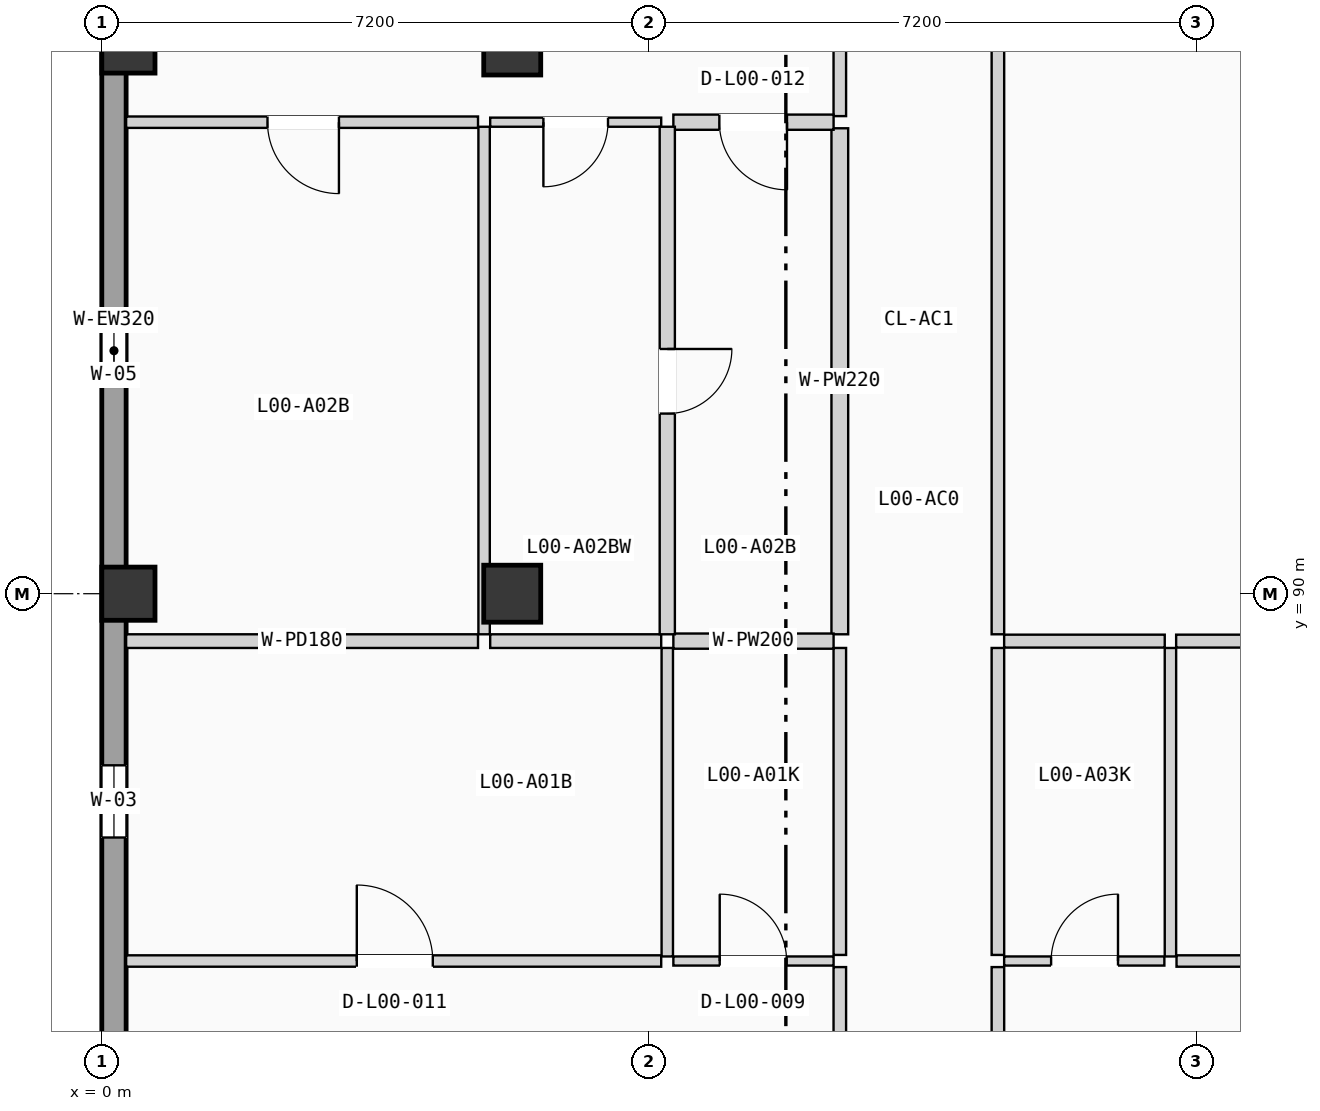
"""IFC4 building model, lengths in metres.
Left out: names, types, materials, properties, quantities, classifications, styles, units other than length and angle.
Written with IfcOpenShell. Run it as: python <this file> out.ifc"""

import sys

from ifc_helpers import new_model, si_unit, direction, frame, frame_2d, origin, origin_2d, place, context, subcontext, project, spatial, rectangle, extrude, element, fill, save


model = new_model("IFC4")
c1 = context("Model", 3, precision=1e-05, world=origin(), true_north=direction((0.0, 1.0)))
c2 = subcontext(c1, "Body", "Model", "MODEL_VIEW")
j1 = project(units=[si_unit("LENGTHUNIT", "METRE"), si_unit("PLANEANGLEUNIT", "RADIAN")], contexts=[c1])
p1 = place(None, origin())
s1 = spatial("IfcSite", under=j1, at=p1, CompositionType="ELEMENT")
p2 = place(p1, origin())
s2 = spatial("IfcBuilding", under=s1, at=p2, CompositionType="ELEMENT")
p3 = place(p2, origin())
s3 = spatial("IfcBuildingStorey", under=s2, at=p3, CompositionType="ELEMENT", Elevation=0.0)
for number, where, z_axis, x_axis in (
    (1, (0.35, 90.0, 0.0), (0.0, 0.0, 1.0), (1.0, 0.0, 0.0)),
    (2, (0.35, 97.2, 0.0), (0.0, 0.0, 1.0), (1.0, 0.0, 0.0)),
):
    element("IfcColumn", number, at=place(p3, frame(where, z_axis=z_axis, x_axis=x_axis)), inside=s3, PredefinedType="COLUMN", context=c2, shape_type="SweptSolid", body=[
        extrude(rectangle(XDim=0.7, YDim=0.7, at=origin_2d()), origin(), (0.0, 0.0, 1.0), 4.9),
    ])
for number, where, z_axis, x_axis in (
    (3, (5.4, 90.0, 0.0), (0.0, 0.0, 1.0), (1.0, 0.0, 0.0)),
    (4, (5.4, 97.2, 0.0), (0.0, 0.0, 1.0), (1.0, 0.0, 0.0)),
):
    element("IfcColumn", number, at=place(p3, frame(where, z_axis=z_axis, x_axis=x_axis)), inside=s3, PredefinedType="COLUMN", context=c2, shape_type="SweptSolid", body=[
        extrude(rectangle(XDim=0.75, YDim=0.75, at=origin_2d()), origin(), (0.0, 0.0, 1.0), 4.9),
    ])
p4 = place(p3, frame((0.16, 68.72, 0.0), z_axis=(0.0, 0.0, 1.0), x_axis=(0.0, 1.0, 0.0)))
e5 = element("IfcWall", 5, at=p4, inside=s3, PredefinedType="SOLIDWALL", context=c2, shape_type="SweptSolid", body=[
    extrude(rectangle(XDim=49.76, YDim=0.32, at=frame_2d((24.88, 0.0))), origin(), (0.0, 0.0, 1.0), 4.64),
])
p5 = place(p4, frame((12.169, 0.0, 0.9)))
e6 = element("IfcOpeningElement", 6, at=p5, cuts=e5, PredefinedType="OPENING", context=c2, shape_type="SweptSolid", body=[
    extrude(rectangle(XDim=0.95, YDim=1.2, at=frame_2d((0.475, 0.6))), frame((0.0, 0.17, 0.0), z_axis=(0.0, -1.0, 0.0), x_axis=(1.0, 0.0, 0.0)), (0.0, 0.0, 1.0), 0.34),
])
p6 = place(p4, frame((8.825, 0.0, 0.9)))
e7 = element("IfcOpeningElement", 7, at=p6, cuts=e5, PredefinedType="OPENING", context=c2, shape_type="SweptSolid", body=[
    extrude(rectangle(XDim=0.95, YDim=1.35, at=frame_2d((0.475, 0.675))), frame((0.0, 0.17, 0.0), z_axis=(0.0, -1.0, 0.0), x_axis=(1.0, 0.0, 0.0)), (0.0, 0.0, 1.0), 0.34),
])
p7 = place(p4, frame((18.072, 0.0, 0.9)))
e8 = element("IfcOpeningElement", 8, at=p7, cuts=e5, PredefinedType="OPENING", context=c2, shape_type="SweptSolid", body=[
    extrude(rectangle(XDim=0.95, YDim=1.5, at=frame_2d((0.475, 0.75))), frame((0.0, 0.17, 0.0), z_axis=(0.0, -1.0, 0.0), x_axis=(1.0, 0.0, 0.0)), (0.0, 0.0, 1.0), 0.34),
])
p8 = place(p4, frame((31.225, 0.0, 0.9)))
e9 = element("IfcOpeningElement", 9, at=p8, cuts=e5, PredefinedType="OPENING", context=c2, shape_type="SweptSolid", body=[
    extrude(rectangle(XDim=0.95, YDim=1.65, at=frame_2d((0.475, 0.825))), frame((0.0, 0.17, 0.0), z_axis=(0.0, -1.0, 0.0), x_axis=(1.0, 0.0, 0.0)), (0.0, 0.0, 1.0), 0.34),
])
p9 = place(p4, frame((24.002, 0.0, 0.9)))
e10 = element("IfcOpeningElement", 10, at=p9, cuts=e5, PredefinedType="OPENING", context=c2, shape_type="SweptSolid", body=[
    extrude(rectangle(XDim=0.95, YDim=1.8, at=frame_2d((0.475, 0.9))), frame((0.0, 0.17, 0.0), z_axis=(0.0, -1.0, 0.0), x_axis=(1.0, 0.0, 0.0)), (0.0, 0.0, 1.0), 0.34),
])
p10 = place(p4, frame((38.69, 0.0, 0.9)))
e11 = element("IfcOpeningElement", 11, at=p10, cuts=e5, PredefinedType="OPENING", context=c2, shape_type="SweptSolid", body=[
    extrude(rectangle(XDim=1.05, YDim=1.2, at=frame_2d((0.525, 0.6))), frame((0.0, 0.17, 0.0), z_axis=(0.0, -1.0, 0.0), x_axis=(1.0, 0.0, 0.0)), (0.0, 0.0, 1.0), 0.34),
])
p11 = place(p3, frame((9.71, 80.199, 0.0), z_axis=(0.0, 0.0, 1.0), x_axis=(0.0, 1.0, 0.0)))
e12 = element("IfcWall", 12, at=p11, inside=s3, PredefinedType="PARTITIONING", context=c2, shape_type="SweptSolid", body=[
    extrude(rectangle(XDim=4.888, YDim=0.165, at=frame_2d((2.444, 0.0))), origin(), (0.0, 0.0, 1.0), 3.84),
])
p12 = place(p11, frame((1.954, 0.0, 0.0)))
e13 = element("IfcOpeningElement", 13, at=p12, cuts=e12, PredefinedType="OPENING", context=c2, shape_type="SweptSolid", body=[
    extrude(rectangle(XDim=0.98, YDim=2.08, at=frame_2d((0.49, 1.04))), frame((0.0, 0.093, 0.0), z_axis=(0.0, -1.0, 0.0), x_axis=(1.0, 0.0, 0.0)), (0.0, 0.0, 1.0), 0.185),
])
p13 = place(p3, frame((9.71, 85.247, 0.0), z_axis=(0.0, 0.0, 1.0), x_axis=(0.0, 1.0, 0.0)))
e14 = element("IfcWall", 14, at=p13, inside=s3, PredefinedType="PARTITIONING", context=c2, shape_type="SweptSolid", body=[
    extrude(rectangle(XDim=4.039, YDim=0.165, at=frame_2d((2.02, 0.0))), origin(), (0.0, 0.0, 1.0), 3.84),
])
p14 = place(p3, frame((9.71, 96.284, 0.0), z_axis=(0.0, 0.0, 1.0), x_axis=(0.0, 1.0, 0.0)))
e15 = element("IfcWall", 15, at=p14, inside=s3, PredefinedType="PARTITIONING", context=c2, shape_type="SweptSolid", body=[
    extrude(rectangle(XDim=7.086, YDim=0.165, at=frame_2d((3.543, 0.0))), origin(), (0.0, 0.0, 1.0), 3.84),
])
p15 = place(p14, frame((3.053, 0.0, 0.0)))
e16 = element("IfcOpeningElement", 16, at=p15, cuts=e15, PredefinedType="OPENING", context=c2, shape_type="SweptSolid", body=[
    extrude(rectangle(XDim=0.98, YDim=2.08, at=frame_2d((0.49, 1.04))), frame((0.0, 0.093, 0.0), z_axis=(0.0, -1.0, 0.0), x_axis=(1.0, 0.0, 0.0)), (0.0, 0.0, 1.0), 0.185),
])
p16 = place(p3, frame((9.71, 89.466, 0.0), z_axis=(0.0, 0.0, 1.0), x_axis=(0.0, 1.0, 0.0)))
e17 = element("IfcWall", 17, at=p16, inside=s3, PredefinedType="PLUMBINGWALL", context=c2, shape_type="SweptSolid", body=[
    extrude(rectangle(XDim=6.658, YDim=0.22, at=frame_2d((3.329, 0.0))), origin(), (0.0, 0.0, 1.0), 3.84),
])
p17 = place(p3, frame((11.79, 80.199, 0.0), z_axis=(0.0, 0.0, 1.0), x_axis=(0.0, 1.0, 0.0)))
e18 = element("IfcWall", 18, at=p17, inside=s3, PredefinedType="PARTITIONING", context=c2, shape_type="SweptSolid", body=[
    extrude(rectangle(XDim=4.888, YDim=0.165, at=frame_2d((2.444, 0.0))), origin(), (0.0, 0.0, 1.0), 3.84),
])
p18 = place(p17, frame((1.954, 0.0, 0.0)))
e19 = element("IfcOpeningElement", 19, at=p18, cuts=e18, PredefinedType="OPENING", context=c2, shape_type="SweptSolid", body=[
    extrude(rectangle(XDim=0.98, YDim=2.08, at=frame_2d((0.49, 1.04))), frame((0.0, 0.093, 0.0), z_axis=(0.0, -1.0, 0.0), x_axis=(1.0, 0.0, 0.0)), (0.0, 0.0, 1.0), 0.185),
])
p19 = place(p3, frame((11.79, 85.247, 0.0), z_axis=(0.0, 0.0, 1.0), x_axis=(0.0, 1.0, 0.0)))
e20 = element("IfcWall", 20, at=p19, inside=s3, PredefinedType="PARTITIONING", context=c2, shape_type="SweptSolid", body=[
    extrude(rectangle(XDim=4.039, YDim=0.165, at=frame_2d((2.02, 0.0))), origin(), (0.0, 0.0, 1.0), 3.84),
])
p20 = place(p3, frame((11.79, 89.466, 0.0), z_axis=(0.0, 0.0, 1.0), x_axis=(0.0, 1.0, 0.0)))
e21 = element("IfcWall", 21, at=p20, inside=s3, PredefinedType="PARTITIONING", context=c2, shape_type="SweptSolid", body=[
    extrude(rectangle(XDim=21.734, YDim=0.165, at=frame_2d((10.867, 0.0))), origin(), (0.0, 0.0, 1.0), 3.84),
])
p21 = place(p20, frame((10.377, 0.0, 0.0)))
e22 = element("IfcOpeningElement", 22, at=p21, cuts=e21, PredefinedType="OPENING", context=c2, shape_type="SweptSolid", body=[
    extrude(rectangle(XDim=0.98, YDim=2.08, at=frame_2d((0.49, 1.04))), frame((0.0, 0.093, 0.0), z_axis=(0.0, -1.0, 0.0), x_axis=(1.0, 0.0, 0.0)), (0.0, 0.0, 1.0), 0.185),
])
p22 = place(p3, frame((7.52, 85.167, 0.0), z_axis=(0.0, 0.0, 1.0), x_axis=(1.0, 0.0, 0.0)))
e23 = element("IfcWall", 23, at=p22, inside=s3, PredefinedType="PARTITIONING", context=c2, shape_type="SweptSolid", body=[
    extrude(rectangle(XDim=2.108, YDim=0.12, at=frame_2d((1.054, 0.0))), origin(), (0.0, 0.0, 1.0), 3.84),
])
p23 = place(p22, frame((0.61, 0.0, 0.0)))
e24 = element("IfcOpeningElement", 24, at=p23, cuts=e23, PredefinedType="OPENING", context=c2, shape_type="SweptSolid", body=[
    extrude(rectangle(XDim=0.88, YDim=2.02, at=frame_2d((0.44, 1.01))), frame((0.0, 0.07, 0.0), z_axis=(0.0, -1.0, 0.0), x_axis=(1.0, 0.0, 0.0)), (0.0, 0.0, 1.0), 0.14),
])
p24 = place(p3, frame((0.32, 85.167, 0.0), z_axis=(0.0, 0.0, 1.0), x_axis=(1.0, 0.0, 0.0)))
e25 = element("IfcWall", 25, at=p24, inside=s3, PredefinedType="PARTITIONING", context=c2, shape_type="SweptSolid", body=[
    extrude(rectangle(XDim=7.04, YDim=0.15, at=frame_2d((3.52, 0.0))), origin(), (0.0, 0.0, 1.0), 3.84),
])
p25 = place(p24, frame((3.035, 0.0, 0.0)))
e26 = element("IfcOpeningElement", 26, at=p25, cuts=e25, PredefinedType="OPENING", context=c2, shape_type="SweptSolid", body=[
    extrude(rectangle(XDim=1.0, YDim=2.06, at=frame_2d((0.5, 1.03))), frame((0.0, 0.085, 0.0), z_axis=(0.0, -1.0, 0.0), x_axis=(1.0, 0.0, 0.0)), (0.0, 0.0, 1.0), 0.17),
])
p26 = place(p3, frame((7.44, 85.227, 0.0), z_axis=(0.0, 0.0, 1.0), x_axis=(0.0, 1.0, 0.0)))
e27 = element("IfcWall", 27, at=p26, inside=s3, PredefinedType="PARTITIONING", context=c2, shape_type="SweptSolid", body=[
    extrude(rectangle(XDim=4.059, YDim=0.15, at=frame_2d((2.029, 0.0))), origin(), (0.0, 0.0, 1.0), 3.84),
])
p27 = place(p3, frame((7.52, 89.376, 0.0), z_axis=(0.0, 0.0, 1.0), x_axis=(1.0, 0.0, 0.0)))
e28 = element("IfcWall", 28, at=p27, inside=s3, PredefinedType="PLUMBINGWALL", context=c2, shape_type="SweptSolid", body=[
    extrude(rectangle(XDim=2.108, YDim=0.2, at=frame_2d((1.054, 0.0))), origin(), (0.0, 0.0, 1.0), 3.84),
])
p28 = place(p3, frame((0.32, 89.376, 0.0), z_axis=(0.0, 0.0, 1.0), x_axis=(1.0, 0.0, 0.0)))
e29 = element("IfcWall", 29, at=p28, inside=s3, PredefinedType="PARTITIONING", context=c2, shape_type="SweptSolid", body=[
    extrude(rectangle(XDim=4.63, YDim=0.18, at=frame_2d((2.315, 0.0))), origin(), (0.0, 0.0, 1.0), 3.84),
])
p29 = place(p3, frame((5.11, 89.376, 0.0), z_axis=(0.0, 0.0, 1.0), x_axis=(1.0, 0.0, 0.0)))
e30 = element("IfcWall", 30, at=p29, inside=s3, PredefinedType="PARTITIONING", context=c2, shape_type="SweptSolid", body=[
    extrude(rectangle(XDim=2.25, YDim=0.18, at=frame_2d((1.125, 0.0))), origin(), (0.0, 0.0, 1.0), 3.84),
])
p30 = place(p3, frame((7.52, 96.204, 0.0), z_axis=(0.0, 0.0, 1.0), x_axis=(1.0, 0.0, 0.0)))
e31 = element("IfcWall", 31, at=p30, inside=s3, PredefinedType="PLUMBINGWALL", context=c2, shape_type="SweptSolid", body=[
    extrude(rectangle(XDim=2.108, YDim=0.2, at=frame_2d((1.054, 0.0))), origin(), (0.0, 0.0, 1.0), 3.84),
])
p31 = place(p30, frame((0.605, 0.0, 0.0)))
e32 = element("IfcOpeningElement", 32, at=p31, cuts=e31, PredefinedType="OPENING", context=c2, shape_type="SweptSolid", body=[
    extrude(rectangle(XDim=0.89, YDim=2.03, at=frame_2d((0.445, 1.015))), frame((0.0, 0.11, 0.0), z_axis=(0.0, -1.0, 0.0), x_axis=(1.0, 0.0, 0.0)), (0.0, 0.0, 1.0), 0.22),
])
p32 = place(p3, frame((0.32, 96.204, 0.0), z_axis=(0.0, 0.0, 1.0), x_axis=(1.0, 0.0, 0.0)))
e33 = element("IfcWall", 33, at=p32, inside=s3, PredefinedType="PARTITIONING", context=c2, shape_type="SweptSolid", body=[
    extrude(rectangle(XDim=4.63, YDim=0.15, at=frame_2d((2.315, 0.0))), origin(), (0.0, 0.0, 1.0), 3.84),
])
p33 = place(p32, frame((1.86, 0.0, 0.0)))
e34 = element("IfcOpeningElement", 34, at=p33, cuts=e33, PredefinedType="OPENING", context=c2, shape_type="SweptSolid", body=[
    extrude(rectangle(XDim=0.94, YDim=2.06, at=frame_2d((0.47, 1.03))), frame((0.0, 0.085, 0.0), z_axis=(0.0, -1.0, 0.0), x_axis=(1.0, 0.0, 0.0)), (0.0, 0.0, 1.0), 0.17),
])
p34 = place(p3, frame((5.11, 96.204, 0.0), z_axis=(0.0, 0.0, 1.0), x_axis=(1.0, 0.0, 0.0)))
e35 = element("IfcWall", 35, at=p34, inside=s3, PredefinedType="PARTITIONING", context=c2, shape_type="SweptSolid", body=[
    extrude(rectangle(XDim=2.25, YDim=0.12, at=frame_2d((1.125, 0.0))), origin(), (0.0, 0.0, 1.0), 3.84),
])
p35 = place(p34, frame((0.7, 0.0, 0.0)))
e36 = element("IfcOpeningElement", 36, at=p35, cuts=e35, PredefinedType="OPENING", context=c2, shape_type="SweptSolid", body=[
    extrude(rectangle(XDim=0.85, YDim=2.01, at=frame_2d((0.425, 1.005))), frame((0.0, 0.07, 0.0), z_axis=(0.0, -1.0, 0.0), x_axis=(1.0, 0.0, 0.0)), (0.0, 0.0, 1.0), 0.14),
])
p36 = place(p3, frame((7.44, 89.466, 0.0), z_axis=(0.0, 0.0, 1.0), x_axis=(0.0, 1.0, 0.0)))
e37 = element("IfcWall", 37, at=p36, inside=s3, PredefinedType="PLUMBINGWALL", context=c2, shape_type="SweptSolid", body=[
    extrude(rectangle(XDim=6.678, YDim=0.2, at=frame_2d((3.339, 0.0))), origin(), (0.0, 0.0, 1.0), 3.84),
])
p37 = place(p36, frame((2.904, 0.0, 0.0)))
e38 = element("IfcOpeningElement", 38, at=p37, cuts=e37, PredefinedType="OPENING", context=c2, shape_type="SweptSolid", body=[
    extrude(rectangle(XDim=0.85, YDim=2.01, at=frame_2d((0.425, 1.005))), frame((0.0, 0.11, 0.0), z_axis=(0.0, -1.0, 0.0), x_axis=(1.0, 0.0, 0.0)), (0.0, 0.0, 1.0), 0.22),
])
p38 = place(p3, frame((5.03, 89.466, 0.0), z_axis=(0.0, 0.0, 1.0), x_axis=(0.0, 1.0, 0.0)))
e39 = element("IfcWall", 39, at=p38, inside=s3, PredefinedType="PARTITIONING", context=c2, shape_type="SweptSolid", body=[
    extrude(rectangle(XDim=6.678, YDim=0.15, at=frame_2d((3.339, 0.0))), origin(), (0.0, 0.0, 1.0), 3.84),
])
p39 = place(p3, frame((11.872, 85.167, 0.0), z_axis=(0.0, 0.0, 1.0), x_axis=(1.0, 0.0, 0.0)))
e40 = element("IfcWall", 40, at=p39, inside=s3, PredefinedType="PARTITIONING", context=c2, shape_type="SweptSolid", body=[
    extrude(rectangle(XDim=2.108, YDim=0.12, at=frame_2d((1.054, 0.0))), origin(), (0.0, 0.0, 1.0), 3.84),
])
p40 = place(p39, frame((0.618, 0.0, 0.0)))
e41 = element("IfcOpeningElement", 41, at=p40, cuts=e40, PredefinedType="OPENING", context=c2, shape_type="SweptSolid", body=[
    extrude(rectangle(XDim=0.88, YDim=2.02, at=frame_2d((0.44, 1.01))), frame((0.0, 0.07, 0.0), z_axis=(0.0, -1.0, 0.0), x_axis=(1.0, 0.0, 0.0)), (0.0, 0.0, 1.0), 0.14),
])
p41 = place(p3, frame((14.14, 85.167, 0.0), z_axis=(0.0, 0.0, 1.0), x_axis=(1.0, 0.0, 0.0)))
e42 = element("IfcWall", 42, at=p41, inside=s3, PredefinedType="PARTITIONING", context=c2, shape_type="SweptSolid", body=[
    extrude(rectangle(XDim=7.14, YDim=0.15, at=frame_2d((3.57, 0.0))), origin(), (0.0, 0.0, 1.0), 3.84),
])
p42 = place(p41, frame((3.085, 0.0, 0.0)))
e43 = element("IfcOpeningElement", 43, at=p42, cuts=e42, PredefinedType="OPENING", context=c2, shape_type="SweptSolid", body=[
    extrude(rectangle(XDim=0.94, YDim=2.06, at=frame_2d((0.47, 1.03))), frame((0.0, 0.085, 0.0), z_axis=(0.0, -1.0, 0.0), x_axis=(1.0, 0.0, 0.0)), (0.0, 0.0, 1.0), 0.17),
])
p43 = place(p3, frame((14.06, 85.227, 0.0), z_axis=(0.0, 0.0, 1.0), x_axis=(0.0, 1.0, 0.0)))
e44 = element("IfcWall", 44, at=p43, inside=s3, PredefinedType="PARTITIONING", context=c2, shape_type="SweptSolid", body=[
    extrude(rectangle(XDim=4.059, YDim=0.15, at=frame_2d((2.029, 0.0))), origin(), (0.0, 0.0, 1.0), 3.84),
])
p44 = place(p3, frame((11.872, 89.376, 0.0), z_axis=(0.0, 0.0, 1.0), x_axis=(1.0, 0.0, 0.0)))
e45 = element("IfcWall", 45, at=p44, inside=s3, PredefinedType="PARTITIONING", context=c2, shape_type="SweptSolid", body=[
    extrude(rectangle(XDim=2.113, YDim=0.17, at=frame_2d((1.057, 0.0))), origin(), (0.0, 0.0, 1.0), 3.84),
])
p45 = place(p3, frame((14.135, 89.376, 0.0), z_axis=(0.0, 0.0, 1.0), x_axis=(1.0, 0.0, 0.0)))
e46 = element("IfcWall", 46, at=p45, inside=s3, PredefinedType="PARTITIONING", context=c2, shape_type="SweptSolid", body=[
    extrude(rectangle(XDim=7.145, YDim=0.17, at=frame_2d((3.573, 0.0))), origin(), (0.0, 0.0, 1.0), 3.84),
])
p46 = place(p7, origin())
e47 = element("IfcWindow", 47, at=p46, inside=s3, PartitioningType="SINGLE_PANEL", PredefinedType="WINDOW", context=c2, shape_type="SweptSolid", body=[
    extrude(rectangle(XDim=0.95, YDim=1.5, at=frame_2d((0.475, 0.75))), frame((0.0, 0.03, 0.0), z_axis=(0.0, -1.0, 0.0), x_axis=(1.0, 0.0, 0.0)), (0.0, 0.0, 1.0), 0.06),
])
fill(e8, e47)
p47 = place(p9, origin())
e48 = element("IfcWindow", 48, at=p47, inside=s3, PartitioningType="SINGLE_PANEL", PredefinedType="WINDOW", context=c2, shape_type="SweptSolid", body=[
    extrude(rectangle(XDim=0.95, YDim=1.8, at=frame_2d((0.475, 0.9))), frame((0.0, 0.03, 0.0), z_axis=(0.0, -1.0, 0.0), x_axis=(1.0, 0.0, 0.0)), (0.0, 0.0, 1.0), 0.06),
])
fill(e10, e48)
p48 = place(p23, origin())
e49 = element("IfcDoor", 49, at=p48, inside=s3, OperationType="SINGLE_SWING_LEFT", PredefinedType="DOOR", context=c2, shape_type="SweptSolid", body=[
    extrude(rectangle(XDim=0.88, YDim=2.02, at=frame_2d((0.44, 1.01))), frame((0.0, 0.025, 0.0), z_axis=(0.0, -1.0, 0.0), x_axis=(1.0, 0.0, 0.0)), (0.0, 0.0, 1.0), 0.05),
])
fill(e24, e49)
p49 = place(p25, origin())
e50 = element("IfcDoor", 50, at=p49, inside=s3, OperationType="SINGLE_SWING_LEFT", PredefinedType="DOOR", context=c2, shape_type="SweptSolid", body=[
    extrude(rectangle(XDim=1.0, YDim=2.06, at=frame_2d((0.5, 1.03))), frame((0.0, 0.025, 0.0), z_axis=(0.0, -1.0, 0.0), x_axis=(1.0, 0.0, 0.0)), (0.0, 0.0, 1.0), 0.05),
])
fill(e26, e50)
p50 = place(p31, frame((0.89, 0.0, 0.0), z_axis=(0.0, 0.0, 1.0), x_axis=(-1.0, 0.0, 0.0)))
e51 = element("IfcDoor", 51, at=p50, inside=s3, OperationType="SINGLE_SWING_RIGHT", PredefinedType="DOOR", context=c2, shape_type="SweptSolid", body=[
    extrude(rectangle(XDim=0.89, YDim=2.03, at=frame_2d((0.445, 1.015))), frame((0.0, 0.025, 0.0), z_axis=(0.0, -1.0, 0.0), x_axis=(1.0, 0.0, 0.0)), (0.0, 0.0, 1.0), 0.05),
])
fill(e32, e51)
p51 = place(p33, frame((0.94, 0.0, 0.0), z_axis=(0.0, 0.0, 1.0), x_axis=(-1.0, 0.0, 0.0)))
e52 = element("IfcDoor", 52, at=p51, inside=s3, OperationType="SINGLE_SWING_RIGHT", PredefinedType="DOOR", context=c2, shape_type="SweptSolid", body=[
    extrude(rectangle(XDim=0.94, YDim=2.06, at=frame_2d((0.47, 1.03))), frame((0.0, 0.025, 0.0), z_axis=(0.0, -1.0, 0.0), x_axis=(1.0, 0.0, 0.0)), (0.0, 0.0, 1.0), 0.05),
])
fill(e34, e52)
p52 = place(p35, frame((0.85, 0.0, 0.0), z_axis=(0.0, 0.0, 1.0), x_axis=(-1.0, 0.0, 0.0)))
e53 = element("IfcDoor", 53, at=p52, inside=s3, OperationType="SINGLE_SWING_LEFT", PredefinedType="DOOR", context=c2, shape_type="SweptSolid", body=[
    extrude(rectangle(XDim=0.85, YDim=2.01, at=frame_2d((0.425, 1.005))), frame((0.0, 0.025, 0.0), z_axis=(0.0, -1.0, 0.0), x_axis=(1.0, 0.0, 0.0)), (0.0, 0.0, 1.0), 0.05),
])
fill(e36, e53)
p53 = place(p37, frame((0.85, 0.0, 0.0), z_axis=(0.0, 0.0, 1.0), x_axis=(-1.0, 0.0, 0.0)))
e54 = element("IfcDoor", 54, at=p53, inside=s3, OperationType="SINGLE_SWING_RIGHT", PredefinedType="DOOR", context=c2, shape_type="SweptSolid", body=[
    extrude(rectangle(XDim=0.85, YDim=2.01, at=frame_2d((0.425, 1.005))), frame((0.0, 0.025, 0.0), z_axis=(0.0, -1.0, 0.0), x_axis=(1.0, 0.0, 0.0)), (0.0, 0.0, 1.0), 0.05),
])
fill(e38, e54)
p54 = place(p40, origin())
e55 = element("IfcDoor", 55, at=p54, inside=s3, OperationType="SINGLE_SWING_RIGHT", PredefinedType="DOOR", context=c2, shape_type="SweptSolid", body=[
    extrude(rectangle(XDim=0.88, YDim=2.02, at=frame_2d((0.44, 1.01))), frame((0.0, 0.025, 0.0), z_axis=(0.0, -1.0, 0.0), x_axis=(1.0, 0.0, 0.0)), (0.0, 0.0, 1.0), 0.05),
])
fill(e41, e55)
save(model, sys.argv[1])
